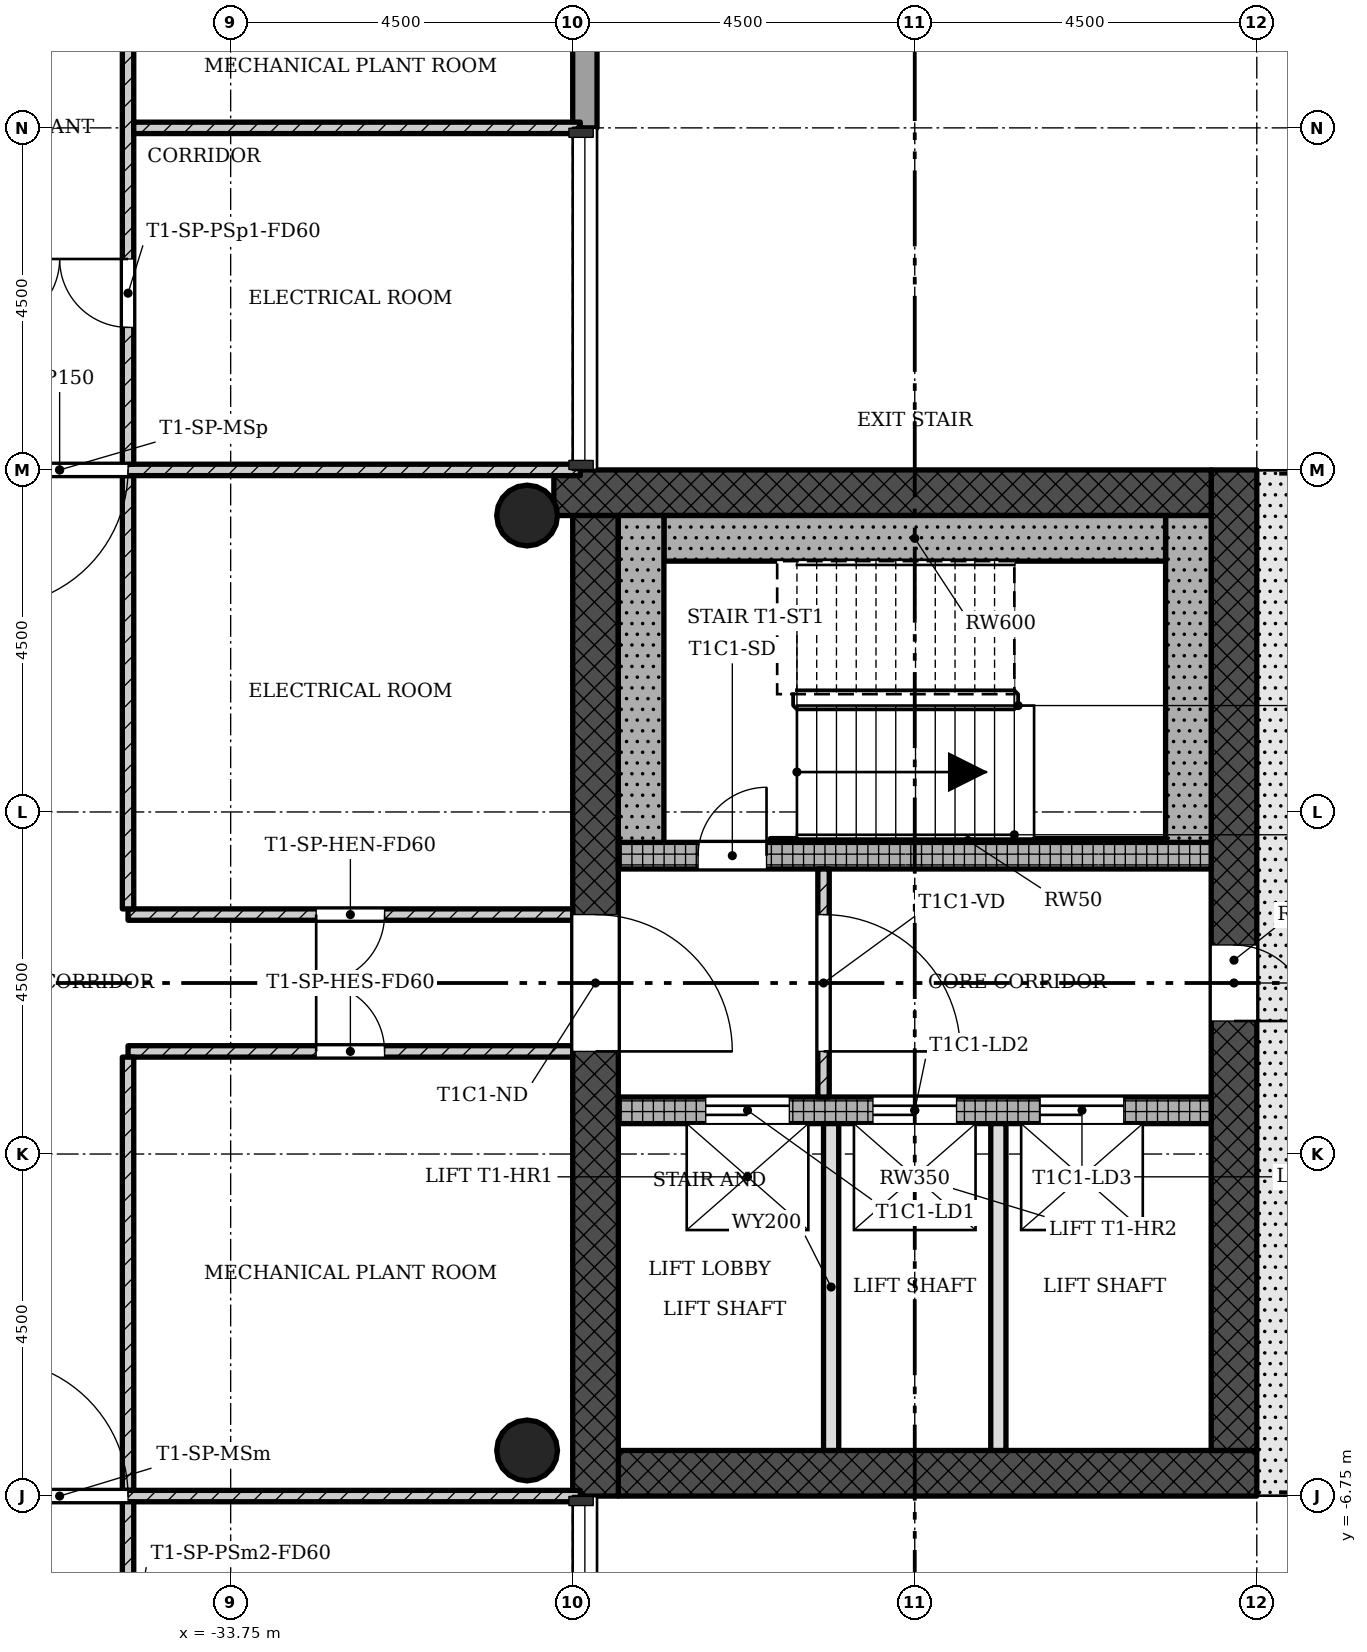
"""IFC4 building model, lengths in metres.
Left out: names, types, materials, properties, quantities, classifications, styles, units other than length and angle.
Written with IfcOpenShell. Run it as: python <this file> out.ifc"""

import sys

from ifc_helpers import new_model, si_unit, direction, frame, frame_2d, origin, origin_2d, place, context, subcontext, project, spatial, rectangle, hollow_circle, extrude, element, fill, save


model = new_model("IFC4")
c1 = context("Model", 3, precision=1e-05, world=origin(), true_north=direction((0.0, 1.0)))
c2 = subcontext(c1, "Body", "Model", "MODEL_VIEW")
j1 = project(units=[si_unit("LENGTHUNIT", "METRE"), si_unit("PLANEANGLEUNIT", "RADIAN")], contexts=[c1])
p1 = place(None, origin())
s1 = spatial("IfcSite", under=j1, at=p1, CompositionType="ELEMENT")
p2 = place(p1, origin())
s2 = spatial("IfcBuilding", under=s1, at=p2, CompositionType="ELEMENT")
p3 = place(p2, frame((0.0, 0.0, 233.4)))
s3 = spatial("IfcBuildingStorey", under=s2, at=p3, CompositionType="ELEMENT", Elevation=233.4)
p4 = place(p3, frame((-28.65, -6.45, 0.0), z_axis=(0.0, 0.0, 1.0), x_axis=(1.0, 0.0, 0.0)))
e1 = element("IfcWall", 1, at=p4, inside=s3, PredefinedType="SHEAR", context=c2, shape_type="SweptSolid", body=[
    extrude(rectangle(XDim=8.4, YDim=0.6, at=frame_2d((4.2, 0.0))), origin(), (0.0, 0.0, 1.0), 4.5),
])
p5 = place(p3, frame((-20.55, -6.15, 0.0), z_axis=(0.0, 0.0, 1.0), x_axis=(0.0, 1.0, 0.0)))
e2 = element("IfcWall", 2, at=p5, inside=s3, PredefinedType="SHEAR", context=c2, shape_type="SweptSolid", body=[
    extrude(rectangle(XDim=12.9, YDim=0.6, at=frame_2d((6.45, 0.0))), origin(), (0.0, 0.0, 1.0), 4.5),
])
p6 = place(p5, frame((5.65, 0.0, 0.0)))
e3 = element("IfcOpeningElement", 3, at=p6, cuts=e2, PredefinedType="OPENING", context=c2, shape_type="SweptSolid", body=[
    extrude(rectangle(XDim=1.0, YDim=2.1, at=frame_2d((0.5, 1.05))), frame((0.0, 0.31, 0.0), z_axis=(0.0, -1.0, 0.0), x_axis=(1.0, 0.0, 0.0)), (0.0, 0.0, 1.0), 0.62),
])
p7 = place(p3, frame((-20.85, 6.45, 0.0), z_axis=(0.0, 0.0, 1.0), x_axis=(-1.0, 0.0, 0.0)))
e4 = element("IfcWall", 4, at=p7, inside=s3, PredefinedType="SHEAR", context=c2, shape_type="SweptSolid", body=[
    extrude(rectangle(XDim=8.648, YDim=0.6, at=frame_2d((4.324, 0.0))), origin(), (0.0, 0.0, 1.0), 4.5),
])
p8 = place(p3, frame((-28.95, 6.15, 0.0), z_axis=(0.0, 0.0, 1.0), x_axis=(0.0, -1.0, 0.0)))
e5 = element("IfcWall", 5, at=p8, inside=s3, PredefinedType="SHEAR", context=c2, shape_type="SweptSolid", body=[
    extrude(rectangle(XDim=12.9, YDim=0.6, at=frame_2d((6.45, 0.0))), origin(), (0.0, 0.0, 1.0), 4.5),
])
p9 = place(p8, frame((5.25, 0.0, 0.0)))
e6 = element("IfcOpeningElement", 6, at=p9, cuts=e5, PredefinedType="OPENING", context=c2, shape_type="SweptSolid", body=[
    extrude(rectangle(XDim=1.8, YDim=2.1, at=frame_2d((0.9, 1.05))), frame((0.0, 0.31, 0.0), z_axis=(0.0, -1.0, 0.0), x_axis=(1.0, 0.0, 0.0)), (0.0, 0.0, 1.0), 0.62),
])
p10 = place(p3, frame((-28.65, -1.675, 0.0), z_axis=(0.0, 0.0, 1.0), x_axis=(1.0, 0.0, 0.0)))
e7 = element("IfcWall", 7, at=p10, inside=s3, PredefinedType="SHEAR", context=c2, shape_type="SweptSolid", body=[
    extrude(rectangle(XDim=7.8, YDim=0.35, at=frame_2d((3.9, 0.0))), origin(), (0.0, 0.0, 1.0), 4.5),
])
p11 = place(p10, frame((1.15, 0.0, 0.0)))
e8 = element("IfcOpeningElement", 8, at=p11, cuts=e7, PredefinedType="OPENING", context=c2, shape_type="SweptSolid", body=[
    extrude(rectangle(XDim=1.1, YDim=2.1, at=frame_2d((0.55, 1.05))), frame((0.0, 0.185, 0.0), z_axis=(0.0, -1.0, 0.0), x_axis=(1.0, 0.0, 0.0)), (0.0, 0.0, 1.0), 0.37),
])
p12 = place(p10, frame((3.35, 0.0, 0.0)))
e9 = element("IfcOpeningElement", 9, at=p12, cuts=e7, PredefinedType="OPENING", context=c2, shape_type="SweptSolid", body=[
    extrude(rectangle(XDim=1.1, YDim=2.1, at=frame_2d((0.55, 1.05))), frame((0.0, 0.185, 0.0), z_axis=(0.0, -1.0, 0.0), x_axis=(1.0, 0.0, 0.0)), (0.0, 0.0, 1.0), 0.37),
])
p13 = place(p10, frame((5.55, 0.0, 0.0)))
e10 = element("IfcOpeningElement", 10, at=p13, cuts=e7, PredefinedType="OPENING", context=c2, shape_type="SweptSolid", body=[
    extrude(rectangle(XDim=1.1, YDim=2.1, at=frame_2d((0.55, 1.05))), frame((0.0, 0.185, 0.0), z_axis=(0.0, -1.0, 0.0), x_axis=(1.0, 0.0, 0.0)), (0.0, 0.0, 1.0), 0.37),
])
p14 = place(p3, frame((-28.65, 1.675, 0.0), z_axis=(0.0, 0.0, 1.0), x_axis=(1.0, 0.0, 0.0)))
e11 = element("IfcWall", 11, at=p14, inside=s3, PredefinedType="SHEAR", context=c2, shape_type="SweptSolid", body=[
    extrude(rectangle(XDim=7.8, YDim=0.35, at=frame_2d((3.9, 0.0))), origin(), (0.0, 0.0, 1.0), 4.5),
])
p15 = place(p14, frame((1.05, 0.0, 0.0)))
e12 = element("IfcOpeningElement", 12, at=p15, cuts=e11, PredefinedType="OPENING", context=c2, shape_type="SweptSolid", body=[
    extrude(rectangle(XDim=0.9, YDim=2.1, at=frame_2d((0.45, 1.05))), frame((0.0, 0.185, 0.0), z_axis=(0.0, -1.0, 0.0), x_axis=(1.0, 0.0, 0.0)), (0.0, 0.0, 1.0), 0.37),
])
for number, where, z_axis, x_axis in (
    (13, (-29.85, -6.15, 0.0), (0.0, 0.0, 1.0), (1.0, 0.0, 0.0)),
    (14, (-29.85, 6.15, 0.0), (0.0, 0.0, 1.0), (1.0, 0.0, 0.0)),
):
    element("IfcColumn", number, at=place(p3, frame(where, z_axis=z_axis, x_axis=x_axis)), inside=s3, PredefinedType="COLUMN", context=c2, shape_type="SweptSolid", body=[
        extrude(hollow_circle(Radius=0.4, WallThickness=0.028, at=origin_2d()), origin(), (0.0, 0.0, 1.0), 4.5),
    ])
p16 = place(p3, frame((-29.09, 11.25, -0.3), z_axis=(0.0, 0.0, 1.0), x_axis=(0.0, 1.0, 0.0)))
e15 = element("IfcWall", 15, at=p16, inside=s3, PredefinedType="STANDARD", context=c2, shape_type="SweptSolid", body=[
    extrude(rectangle(XDim=1.82, YDim=0.32, at=frame_2d((0.91, 0.0))), origin(), (0.0, 0.0, 1.0), 4.5),
])
p17 = place(p3, frame((-25.95, -1.5, 0.0), z_axis=(0.0, 0.0, 1.0), x_axis=(0.0, 1.0, 0.0)))
e16 = element("IfcWall", 16, at=p17, inside=s3, PredefinedType="PARTITIONING", context=c2, shape_type="SweptSolid", body=[
    extrude(rectangle(XDim=3.0, YDim=0.15, at=frame_2d((1.5, 0.0))), origin(), (0.0, 0.0, 1.0), 4.1),
])
p18 = place(p17, frame((0.6, 0.0, 0.0)))
e17 = element("IfcOpeningElement", 17, at=p18, cuts=e16, PredefinedType="OPENING", context=c2, shape_type="SweptSolid", body=[
    extrude(rectangle(XDim=1.8, YDim=2.1, at=frame_2d((0.9, 1.05))), frame((0.0, 0.085, 0.0), z_axis=(0.0, -1.0, 0.0), x_axis=(1.0, 0.0, 0.0)), (0.0, 0.0, 1.0), 0.17),
])
for number, where, z_axis, x_axis in (
    (18, (-25.85, -6.15, 0.0), (0.0, 0.0, 1.0), (0.0, 1.0, 0.0)),
    (19, (-23.65, -6.15, 0.0), (0.0, 0.0, 1.0), (0.0, 1.0, 0.0)),
):
    element("IfcWall", number, at=place(p3, frame(where, z_axis=z_axis, x_axis=x_axis)), inside=s3, PredefinedType="SOLIDWALL", context=c2, shape_type="SweptSolid", body=[
        extrude(rectangle(XDim=4.3, YDim=0.2, at=frame_2d((2.15, 0.0))), origin(), (0.0, 0.0, 1.0), 4.1),
    ])
p19 = place(p3, frame((-35.1, 0.9, 0.0), z_axis=(0.0, 0.0, 1.0), x_axis=(1.0, 0.0, 0.0)))
e20 = element("IfcWall", 20, at=p19, inside=s3, PredefinedType="PARTITIONING", context=c2, shape_type="SweptSolid", body=[
    extrude(rectangle(XDim=5.85, YDim=0.15, at=frame_2d((2.925, 0.0))), origin(), (0.0, 0.0, 1.0), 4.1),
])
p20 = place(p19, frame((2.475, 0.0, 0.0)))
e21 = element("IfcOpeningElement", 21, at=p20, cuts=e20, PredefinedType="OPENING", context=c2, shape_type="SweptSolid", body=[
    extrude(rectangle(XDim=0.9, YDim=2.1, at=frame_2d((0.45, 1.05))), frame((0.0, 0.085, 0.0), z_axis=(0.0, -1.0, 0.0), x_axis=(1.0, 0.0, 0.0)), (0.0, 0.0, 1.0), 0.17),
])
p21 = place(p3, frame((-35.1, 0.975, 0.0), z_axis=(0.0, 0.0, 1.0), x_axis=(0.0, 1.0, 0.0)))
e22 = element("IfcWall", 22, at=p21, inside=s3, PredefinedType="PARTITIONING", context=c2, shape_type="SweptSolid", body=[
    extrude(rectangle(XDim=5.7, YDim=0.15, at=frame_2d((2.85, 0.0))), origin(), (0.0, 0.0, 1.0), 4.1),
])
p22 = place(p3, frame((-35.1, -0.9, 0.0), z_axis=(0.0, 0.0, 1.0), x_axis=(1.0, 0.0, 0.0)))
e23 = element("IfcWall", 23, at=p22, inside=s3, PredefinedType="PARTITIONING", context=c2, shape_type="SweptSolid", body=[
    extrude(rectangle(XDim=5.85, YDim=0.15, at=frame_2d((2.925, 0.0))), origin(), (0.0, 0.0, 1.0), 4.1),
])
p23 = place(p22, frame((2.475, 0.0, 0.0)))
e24 = element("IfcOpeningElement", 24, at=p23, cuts=e23, PredefinedType="OPENING", context=c2, shape_type="SweptSolid", body=[
    extrude(rectangle(XDim=0.9, YDim=2.1, at=frame_2d((0.45, 1.05))), frame((0.0, 0.085, 0.0), z_axis=(0.0, -1.0, 0.0), x_axis=(1.0, 0.0, 0.0)), (0.0, 0.0, 1.0), 0.17),
])
p24 = place(p3, frame((-35.1, -6.675, 0.0), z_axis=(0.0, 0.0, 1.0), x_axis=(0.0, 1.0, 0.0)))
e25 = element("IfcWall", 25, at=p24, inside=s3, PredefinedType="PARTITIONING", context=c2, shape_type="SweptSolid", body=[
    extrude(rectangle(XDim=5.7, YDim=0.15, at=frame_2d((2.85, 0.0))), origin(), (0.0, 0.0, 1.0), 4.1),
])
p25 = place(p3, frame((-42.85, 6.75, 0.0), z_axis=(0.0, 0.0, 1.0), x_axis=(1.0, 0.0, 0.0)))
e26 = element("IfcWall", 26, at=p25, inside=s3, PredefinedType="PARTITIONING", context=c2, shape_type="SweptSolid", body=[
    extrude(rectangle(XDim=13.7, YDim=0.15, at=frame_2d((6.85, 0.0))), origin(), (0.0, 0.0, 1.0), 4.1),
])
p26 = place(p25, frame((5.95, 0.0, 0.0)))
e27 = element("IfcOpeningElement", 27, at=p26, cuts=e26, PredefinedType="OPENING", context=c2, shape_type="SweptSolid", body=[
    extrude(rectangle(XDim=1.8, YDim=2.1, at=frame_2d((0.9, 1.05))), frame((0.0, 0.085, 0.0), z_axis=(0.0, -1.0, 0.0), x_axis=(1.0, 0.0, 0.0)), (0.0, 0.0, 1.0), 0.17),
])
p27 = place(p3, frame((-35.1, 6.825, 0.0), z_axis=(0.0, 0.0, 1.0), x_axis=(0.0, 1.0, 0.0)))
e28 = element("IfcWall", 28, at=p27, inside=s3, PredefinedType="PARTITIONING", context=c2, shape_type="SweptSolid", body=[
    extrude(rectangle(XDim=9.025, YDim=0.15, at=frame_2d((4.513, 0.0))), origin(), (0.0, 0.0, 1.0), 4.1),
])
p28 = place(p27, frame((1.8, 0.0, 0.0)))
e29 = element("IfcOpeningElement", 29, at=p28, cuts=e28, PredefinedType="OPENING", context=c2, shape_type="SweptSolid", body=[
    extrude(rectangle(XDim=0.9, YDim=2.1, at=frame_2d((0.45, 1.05))), frame((0.0, 0.085, 0.0), z_axis=(0.0, -1.0, 0.0), x_axis=(1.0, 0.0, 0.0)), (0.0, 0.0, 1.0), 0.17),
])
p29 = place(p27, frame((6.3, 0.0, 0.0)))
e30 = element("IfcOpeningElement", 30, at=p29, cuts=e28, PredefinedType="OPENING", context=c2, shape_type="SweptSolid", body=[
    extrude(rectangle(XDim=0.9, YDim=2.1, at=frame_2d((0.45, 1.05))), frame((0.0, 0.085, 0.0), z_axis=(0.0, -1.0, 0.0), x_axis=(1.0, 0.0, 0.0)), (0.0, 0.0, 1.0), 0.17),
])
p30 = place(p3, frame((-35.025, 11.25, 0.0), z_axis=(0.0, 0.0, 1.0), x_axis=(1.0, 0.0, 0.0)))
e31 = element("IfcWall", 31, at=p30, inside=s3, PredefinedType="PARTITIONING", context=c2, shape_type="SweptSolid", body=[
    extrude(rectangle(XDim=5.875, YDim=0.15, at=frame_2d((2.938, 0.0))), origin(), (0.0, 0.0, 1.0), 4.1),
])
p31 = place(p3, frame((-42.85, -6.75, 0.0), z_axis=(0.0, 0.0, 1.0), x_axis=(1.0, 0.0, 0.0)))
e32 = element("IfcWall", 32, at=p31, inside=s3, PredefinedType="PARTITIONING", context=c2, shape_type="SweptSolid", body=[
    extrude(rectangle(XDim=13.7, YDim=0.15, at=frame_2d((6.85, 0.0))), origin(), (0.0, 0.0, 1.0), 4.1),
])
p32 = place(p31, frame((5.95, 0.0, 0.0)))
e33 = element("IfcOpeningElement", 33, at=p32, cuts=e32, PredefinedType="OPENING", context=c2, shape_type="SweptSolid", body=[
    extrude(rectangle(XDim=1.8, YDim=2.1, at=frame_2d((0.9, 1.05))), frame((0.0, 0.085, 0.0), z_axis=(0.0, -1.0, 0.0), x_axis=(1.0, 0.0, 0.0)), (0.0, 0.0, 1.0), 0.17),
])
p33 = place(p3, frame((-35.1, -15.85, 0.0), z_axis=(0.0, 0.0, 1.0), x_axis=(0.0, 1.0, 0.0)))
e34 = element("IfcWall", 34, at=p33, inside=s3, PredefinedType="PARTITIONING", context=c2, shape_type="SweptSolid", body=[
    extrude(rectangle(XDim=9.025, YDim=0.15, at=frame_2d((4.513, 0.0))), origin(), (0.0, 0.0, 1.0), 4.1),
])
p34 = place(p33, frame((1.9, 0.0, 0.0)))
e35 = element("IfcOpeningElement", 35, at=p34, cuts=e34, PredefinedType="OPENING", context=c2, shape_type="SweptSolid", body=[
    extrude(rectangle(XDim=0.9, YDim=2.1, at=frame_2d((0.45, 1.05))), frame((0.0, 0.085, 0.0), z_axis=(0.0, -1.0, 0.0), x_axis=(1.0, 0.0, 0.0)), (0.0, 0.0, 1.0), 0.17),
])
p35 = place(p33, frame((6.4, 0.0, 0.0)))
e36 = element("IfcOpeningElement", 36, at=p35, cuts=e34, PredefinedType="OPENING", context=c2, shape_type="SweptSolid", body=[
    extrude(rectangle(XDim=0.9, YDim=2.1, at=frame_2d((0.45, 1.05))), frame((0.0, 0.085, 0.0), z_axis=(0.0, -1.0, 0.0), x_axis=(1.0, 0.0, 0.0)), (0.0, 0.0, 1.0), 0.17),
])
p36 = place(p3, frame((-21.15, 1.85, 0.0), z_axis=(0.0, 0.0, 1.0), x_axis=(0.0, 1.0, 0.0)))
e37 = element("IfcWall", 37, at=p36, inside=s3, PredefinedType="SHEAR", context=c2, shape_type="SweptSolid", body=[
    extrude(rectangle(XDim=4.3, YDim=0.6, at=frame_2d((2.15, 0.0))), origin(), (0.0, 0.0, 1.0), 4.5),
])
p37 = place(p3, frame((-28.05, 5.85, 0.0), z_axis=(0.0, 0.0, 1.0), x_axis=(1.0, 0.0, 0.0)))
e38 = element("IfcWall", 38, at=p37, inside=s3, PredefinedType="SHEAR", context=c2, shape_type="SweptSolid", body=[
    extrude(rectangle(XDim=6.6, YDim=0.6, at=frame_2d((3.3, 0.0))), origin(), (0.0, 0.0, 1.0), 4.5),
])
p38 = place(p3, frame((-28.35, 1.85, 0.0), z_axis=(0.0, 0.0, 1.0), x_axis=(0.0, 1.0, 0.0)))
e39 = element("IfcWall", 39, at=p38, inside=s3, PredefinedType="SHEAR", context=c2, shape_type="SweptSolid", body=[
    extrude(rectangle(XDim=4.3, YDim=0.6, at=frame_2d((2.15, 0.0))), origin(), (0.0, 0.0, 1.0), 4.5),
])
p39 = place(p3, frame((-26.65, 1.875, 0.0), z_axis=(0.0, 0.0, 1.0), x_axis=(1.0, 0.0, 0.0)))
e40 = element("IfcWall", 40, at=p39, inside=s3, PredefinedType="SHEAR", context=c2, shape_type="SweptSolid", body=[
    extrude(rectangle(XDim=5.2, YDim=0.05, at=frame_2d((2.6, 0.0))), origin(), (0.0, 0.0, 1.0), 4.5),
])
p40 = place(p6, origin())
e41 = element("IfcDoor", 41, at=p40, inside=s3, OperationType="SINGLE_SWING_LEFT", PredefinedType="DOOR", context=c2, shape_type="SweptSolid", body=[
    extrude(rectangle(XDim=1.0, YDim=2.1, at=frame_2d((0.5, 1.05))), frame((0.0, 0.025, 0.0), z_axis=(0.0, -1.0, 0.0), x_axis=(1.0, 0.0, 0.0)), (0.0, 0.0, 1.0), 0.05),
])
fill(e3, e41)
p41 = place(p18, origin())
e42 = element("IfcDoor", 42, at=p41, inside=s3, OperationType="SINGLE_SWING_LEFT", PredefinedType="DOOR", context=c2, shape_type="SweptSolid", body=[
    extrude(rectangle(XDim=1.8, YDim=2.1, at=frame_2d((0.9, 1.05))), frame((0.0, 0.025, 0.0), z_axis=(0.0, -1.0, 0.0), x_axis=(1.0, 0.0, 0.0)), (0.0, 0.0, 1.0), 0.05),
])
fill(e17, e42)
p42 = place(p20, origin())
e43 = element("IfcDoor", 43, at=p42, inside=s3, OperationType="SINGLE_SWING_LEFT", PredefinedType="DOOR", context=c2, shape_type="SweptSolid", body=[
    extrude(rectangle(XDim=0.9, YDim=2.1, at=frame_2d((0.45, 1.05))), frame((0.0, 0.025, 0.0), z_axis=(0.0, -1.0, 0.0), x_axis=(1.0, 0.0, 0.0)), (0.0, 0.0, 1.0), 0.05),
])
fill(e21, e43)
p43 = place(p23, origin())
e44 = element("IfcDoor", 44, at=p43, inside=s3, OperationType="SINGLE_SWING_RIGHT", PredefinedType="DOOR", context=c2, shape_type="SweptSolid", body=[
    extrude(rectangle(XDim=0.9, YDim=2.1, at=frame_2d((0.45, 1.05))), frame((0.0, 0.025, 0.0), z_axis=(0.0, -1.0, 0.0), x_axis=(1.0, 0.0, 0.0)), (0.0, 0.0, 1.0), 0.05),
])
fill(e24, e44)
p44 = place(p26, origin())
e45 = element("IfcDoor", 45, at=p44, inside=s3, OperationType="SINGLE_SWING_LEFT", PredefinedType="DOOR", context=c2, shape_type="SweptSolid", body=[
    extrude(rectangle(XDim=1.8, YDim=2.1, at=frame_2d((0.9, 1.05))), frame((0.0, 0.025, 0.0), z_axis=(0.0, -1.0, 0.0), x_axis=(1.0, 0.0, 0.0)), (0.0, 0.0, 1.0), 0.05),
])
fill(e27, e45)
p45 = place(p28, origin())
e46 = element("IfcDoor", 46, at=p45, inside=s3, OperationType="SINGLE_SWING_LEFT", PredefinedType="DOOR", context=c2, shape_type="SweptSolid", body=[
    extrude(rectangle(XDim=0.9, YDim=2.1, at=frame_2d((0.45, 1.05))), frame((0.0, 0.025, 0.0), z_axis=(0.0, -1.0, 0.0), x_axis=(1.0, 0.0, 0.0)), (0.0, 0.0, 1.0), 0.05),
])
fill(e29, e46)
p46 = place(p32, origin())
e47 = element("IfcDoor", 47, at=p46, inside=s3, OperationType="SINGLE_SWING_RIGHT", PredefinedType="DOOR", context=c2, shape_type="SweptSolid", body=[
    extrude(rectangle(XDim=1.8, YDim=2.1, at=frame_2d((0.9, 1.05))), frame((0.0, 0.025, 0.0), z_axis=(0.0, -1.0, 0.0), x_axis=(1.0, 0.0, 0.0)), (0.0, 0.0, 1.0), 0.05),
])
fill(e33, e47)
p47 = place(p15, origin())
e48 = element("IfcDoor", 48, at=p47, inside=s3, OperationType="SINGLE_SWING_LEFT", PredefinedType="DOOR", context=c2, shape_type="SweptSolid", body=[
    extrude(rectangle(XDim=0.9, YDim=2.1, at=frame_2d((0.45, 1.05))), frame((0.0, 0.025, 0.0), z_axis=(0.0, -1.0, 0.0), x_axis=(1.0, 0.0, 0.0)), (0.0, 0.0, 1.0), 0.05),
])
fill(e12, e48)
p48 = place(p11, origin())
e49 = element("IfcDoor", 49, at=p48, inside=s3, OperationType="SLIDING_TO_LEFT", PredefinedType="DOOR", context=c2, shape_type="SweptSolid", body=[
    extrude(rectangle(XDim=1.1, YDim=2.1, at=frame_2d((0.55, 1.05))), frame((0.0, 0.025, 0.0), z_axis=(0.0, -1.0, 0.0), x_axis=(1.0, 0.0, 0.0)), (0.0, 0.0, 1.0), 0.05),
])
fill(e8, e49)
p49 = place(p12, origin())
e50 = element("IfcDoor", 50, at=p49, inside=s3, OperationType="SLIDING_TO_LEFT", PredefinedType="DOOR", context=c2, shape_type="SweptSolid", body=[
    extrude(rectangle(XDim=1.1, YDim=2.1, at=frame_2d((0.55, 1.05))), frame((0.0, 0.025, 0.0), z_axis=(0.0, -1.0, 0.0), x_axis=(1.0, 0.0, 0.0)), (0.0, 0.0, 1.0), 0.05),
])
fill(e9, e50)
p50 = place(p13, origin())
e51 = element("IfcDoor", 51, at=p50, inside=s3, OperationType="SLIDING_TO_LEFT", PredefinedType="DOOR", context=c2, shape_type="SweptSolid", body=[
    extrude(rectangle(XDim=1.1, YDim=2.1, at=frame_2d((0.55, 1.05))), frame((0.0, 0.025, 0.0), z_axis=(0.0, -1.0, 0.0), x_axis=(1.0, 0.0, 0.0)), (0.0, 0.0, 1.0), 0.05),
])
fill(e10, e51)
p51 = place(p9, origin())
e52 = element("IfcDoor", 52, at=p51, inside=s3, OperationType="SINGLE_SWING_LEFT", PredefinedType="DOOR", context=c2, shape_type="SweptSolid", body=[
    extrude(rectangle(XDim=1.8, YDim=2.1, at=frame_2d((0.9, 1.05))), frame((0.0, 0.025, 0.0), z_axis=(0.0, -1.0, 0.0), x_axis=(1.0, 0.0, 0.0)), (0.0, 0.0, 1.0), 0.05),
])
fill(e6, e52)
save(model, sys.argv[1])
